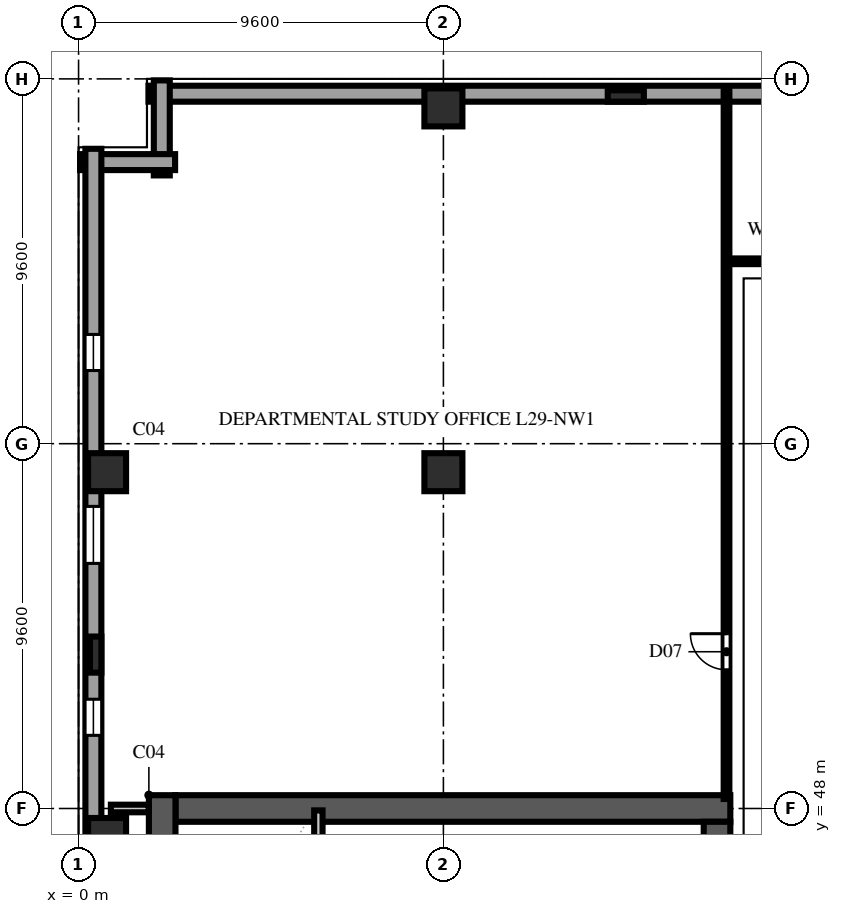
"""IFC4 building model, lengths in metres.
Left out: names, types, materials, properties, quantities, classifications, styles, units other than length and angle.
Written with IfcOpenShell. Run it as: python <this file> out.ifc"""

import sys

from ifc_helpers import new_model, si_unit, direction, frame, frame_2d, origin, origin_2d, place, context, subcontext, project, spatial, rectangle, extrude, element, fill, save


model = new_model("IFC4")
c1 = context("Model", 3, precision=1e-05, world=origin(), true_north=direction((0.0, 1.0)))
c2 = subcontext(c1, "Body", "Model", "MODEL_VIEW")
j1 = project(units=[si_unit("LENGTHUNIT", "METRE"), si_unit("PLANEANGLEUNIT", "RADIAN")], contexts=[c1])
p1 = place(None, origin())
s1 = spatial("IfcSite", under=j1, at=p1, CompositionType="ELEMENT")
p2 = place(p1, origin())
s2 = spatial("IfcBuilding", under=s1, at=p2, CompositionType="ELEMENT")
p3 = place(p2, frame((0.0, 0.0, 116.6)))
s3 = spatial("IfcBuildingStorey", under=s2, at=p3, CompositionType="ELEMENT", Elevation=116.6)
p4 = place(p3, frame((2.55, 48.0, 0.0), z_axis=(0.0, 0.0, 1.0), x_axis=(1.0, 0.0, 0.0)))
e1 = element("IfcWall", 1, at=p4, inside=s3, PredefinedType="SHEAR", context=c2, shape_type="SweptSolid", body=[
    extrude(rectangle(XDim=14.6, YDim=0.7, at=frame_2d((7.3, 0.0))), origin(), (0.0, 0.0, 1.0), 3.54),
])
p5 = place(p3, frame((2.2, 9.25, 0.0), z_axis=(0.0, 0.0, 1.0), x_axis=(0.0, 1.0, 0.0)))
e2 = element("IfcWall", 2, at=p5, inside=s3, PredefinedType="SHEAR", context=c2, shape_type="SweptSolid", body=[
    extrude(rectangle(XDim=39.1, YDim=0.7, at=frame_2d((19.55, 0.0))), origin(), (0.0, 0.0, 1.0), 3.54),
])
p6 = place(p3, frame((16.8, 36.4, 0.0), z_axis=(0.0, 0.0, 1.0), x_axis=(0.0, 1.0, 0.0)))
e3 = element("IfcWall", 3, at=p6, inside=s3, PredefinedType="SHEAR", context=c2, shape_type="SweptSolid", body=[
    extrude(rectangle(XDim=11.25, YDim=0.7, at=frame_2d((5.625, 0.0))), origin(), (0.0, 0.0, 1.0), 3.54),
])
p7 = place(p6, frame((9.2, 0.0, 0.0)))
e4 = element("IfcOpeningElement", 4, at=p7, cuts=e3, PredefinedType="OPENING", context=c2, shape_type="SweptSolid", body=[
    extrude(rectangle(XDim=0.95, YDim=2.15, at=frame_2d((0.475, 1.075))), frame((0.0, 0.362, 0.0), z_axis=(0.0, -1.0, 0.0), x_axis=(1.0, 0.0, 0.0)), (0.0, 0.0, 1.0), 0.724),
])
for number, where, z_axis, x_axis in (
    (5, (0.75, 47.25, 0.0), (0.0, 0.0, 1.0), (1.0, 0.0, 0.0)),
    (6, (0.75, 56.85, 0.0), (0.0, 0.0, 1.0), (1.0, 0.0, 0.0)),
    (7, (9.6, 56.85, 0.0), (0.0, 0.0, 1.0), (1.0, 0.0, 0.0)),
    (8, (9.6, 66.45, 0.0), (0.0, 0.0, 1.0), (1.0, 0.0, 0.0)),
):
    element("IfcColumn", number, at=place(p3, frame(where, z_axis=z_axis, x_axis=x_axis)), inside=s3, PredefinedType="COLUMN", context=c2, shape_type="SweptSolid", body=[
        extrude(rectangle(XDim=1.0, YDim=1.0, at=origin_2d()), origin(), (0.0, 0.0, 1.0), 3.8),
    ])
for number, where, z_axis, x_axis in (
    (9, (0.45, 52.05, 0.0), (0.0, 0.0, 1.0), (0.0, 1.0, 0.0)),
    (10, (14.4, 66.75, 0.0), (0.0, 0.0, 1.0), (1.0, 0.0, 0.0)),
):
    element("IfcColumn", number, at=place(p3, frame(where, z_axis=z_axis, x_axis=x_axis)), inside=s3, PredefinedType="PILASTER", context=c2, shape_type="SweptSolid", body=[
        extrude(rectangle(XDim=0.95, YDim=0.3, at=origin_2d()), origin(), (0.0, 0.0, 1.0), 3.8),
    ])
p8 = place(p3, frame((36.56, 66.81, 0.0), z_axis=(0.0, 0.0, 1.0), x_axis=(-1.0, 0.0, 0.0)))
e11 = element("IfcWall", 11, at=p8, inside=s3, PredefinedType="SOLIDWALL", context=c2, shape_type="SweptSolid", body=[
    extrude(rectangle(XDim=34.72, YDim=0.42, at=frame_2d((17.36, 0.0))), origin(), (0.0, 0.0, 1.0), 3.54),
])
p9 = place(p8, frame((4.885, 0.0, 0.9)))
e12 = element("IfcOpeningElement", 12, at=p9, cuts=e11, PredefinedType="OPENING", context=c2, shape_type="SweptSolid", body=[
    extrude(rectangle(XDim=0.95, YDim=1.85, at=frame_2d((0.475, 0.925))), frame((0.0, 0.222, 0.0), z_axis=(0.0, -1.0, 0.0), x_axis=(1.0, 0.0, 0.0)), (0.0, 0.0, 1.0), 0.444),
])
p10 = place(p8, frame((9.41, 0.0, 0.9)))
e13 = element("IfcOpeningElement", 13, at=p10, cuts=e11, PredefinedType="OPENING", context=c2, shape_type="SweptSolid", body=[
    extrude(rectangle(XDim=1.5, YDim=1.85, at=frame_2d((0.75, 0.925))), frame((0.0, 0.222, 0.0), z_axis=(0.0, -1.0, 0.0), x_axis=(1.0, 0.0, 0.0)), (0.0, 0.0, 1.0), 0.444),
])
p11 = place(p8, frame((14.485, 0.0, 0.9)))
e14 = element("IfcOpeningElement", 14, at=p11, cuts=e11, PredefinedType="OPENING", context=c2, shape_type="SweptSolid", body=[
    extrude(rectangle(XDim=0.95, YDim=1.85, at=frame_2d((0.475, 0.925))), frame((0.0, 0.222, 0.0), z_axis=(0.0, -1.0, 0.0), x_axis=(1.0, 0.0, 0.0)), (0.0, 0.0, 1.0), 0.444),
])
for number, where, z_axis, x_axis in (
    (15, (2.19, 67.16, 0.0), (0.0, 0.0, 1.0), (0.0, -1.0, 0.0)),
    (16, (2.54, 65.01, 0.0), (0.0, 0.0, 1.0), (-1.0, 0.0, 0.0)),
):
    element("IfcWall", number, at=place(p3, frame(where, z_axis=z_axis, x_axis=x_axis)), inside=s3, PredefinedType="SOLIDWALL", context=c2, shape_type="SweptSolid", body=[
        extrude(rectangle(XDim=2.5, YDim=0.42, at=frame_2d((1.25, 0.0))), origin(), (0.0, 0.0, 1.0), 3.54),
    ])
p12 = place(p3, frame((0.39, 65.36, 0.0), z_axis=(0.0, 0.0, 1.0), x_axis=(0.0, -1.0, 0.0)))
e17 = element("IfcWall", 17, at=p12, inside=s3, PredefinedType="SOLIDWALL", context=c2, shape_type="SweptSolid", body=[
    extrude(rectangle(XDim=63.52, YDim=0.42, at=frame_2d((31.76, 0.0))), origin(), (0.0, 0.0, 1.0), 3.54),
])
p13 = place(p12, frame((4.885, 0.0, 0.9)))
e18 = element("IfcOpeningElement", 18, at=p13, cuts=e17, PredefinedType="OPENING", context=c2, shape_type="SweptSolid", body=[
    extrude(rectangle(XDim=0.95, YDim=1.85, at=frame_2d((0.475, 0.925))), frame((0.0, 0.222, 0.0), z_axis=(0.0, -1.0, 0.0), x_axis=(1.0, 0.0, 0.0)), (0.0, 0.0, 1.0), 0.444),
])
p14 = place(p12, frame((9.41, 0.0, 0.9)))
e19 = element("IfcOpeningElement", 19, at=p14, cuts=e17, PredefinedType="OPENING", context=c2, shape_type="SweptSolid", body=[
    extrude(rectangle(XDim=1.5, YDim=1.85, at=frame_2d((0.75, 0.925))), frame((0.0, 0.222, 0.0), z_axis=(0.0, -1.0, 0.0), x_axis=(1.0, 0.0, 0.0)), (0.0, 0.0, 1.0), 0.444),
])
p15 = place(p12, frame((14.485, 0.0, 0.9)))
e20 = element("IfcOpeningElement", 20, at=p15, cuts=e17, PredefinedType="OPENING", context=c2, shape_type="SweptSolid", body=[
    extrude(rectangle(XDim=0.95, YDim=1.85, at=frame_2d((0.475, 0.925))), frame((0.0, 0.222, 0.0), z_axis=(0.0, -1.0, 0.0), x_axis=(1.0, 0.0, 0.0)), (0.0, 0.0, 1.0), 0.444),
])
p16 = place(p12, frame((19.01, 0.0, 0.9)))
e21 = element("IfcOpeningElement", 21, at=p16, cuts=e17, PredefinedType="OPENING", context=c2, shape_type="SweptSolid", body=[
    extrude(rectangle(XDim=1.5, YDim=1.85, at=frame_2d((0.75, 0.925))), frame((0.0, 0.222, 0.0), z_axis=(0.0, -1.0, 0.0), x_axis=(1.0, 0.0, 0.0)), (0.0, 0.0, 1.0), 0.444),
])
p17 = place(p12, frame((24.085, 0.0, 0.9)))
e22 = element("IfcOpeningElement", 22, at=p17, cuts=e17, PredefinedType="OPENING", context=c2, shape_type="SweptSolid", body=[
    extrude(rectangle(XDim=0.95, YDim=1.85, at=frame_2d((0.475, 0.925))), frame((0.0, 0.222, 0.0), z_axis=(0.0, -1.0, 0.0), x_axis=(1.0, 0.0, 0.0)), (0.0, 0.0, 1.0), 0.444),
])
p18 = place(p12, frame((28.61, 0.0, 0.9)))
e23 = element("IfcOpeningElement", 23, at=p18, cuts=e17, PredefinedType="OPENING", context=c2, shape_type="SweptSolid", body=[
    extrude(rectangle(XDim=1.5, YDim=1.85, at=frame_2d((0.75, 0.925))), frame((0.0, 0.222, 0.0), z_axis=(0.0, -1.0, 0.0), x_axis=(1.0, 0.0, 0.0)), (0.0, 0.0, 1.0), 0.444),
])
p19 = place(p12, frame((33.685, 0.0, 0.9)))
e24 = element("IfcOpeningElement", 24, at=p19, cuts=e17, PredefinedType="OPENING", context=c2, shape_type="SweptSolid", body=[
    extrude(rectangle(XDim=0.95, YDim=1.85, at=frame_2d((0.475, 0.925))), frame((0.0, 0.222, 0.0), z_axis=(0.0, -1.0, 0.0), x_axis=(1.0, 0.0, 0.0)), (0.0, 0.0, 1.0), 0.444),
])
p20 = place(p12, frame((38.21, 0.0, 0.9)))
e25 = element("IfcOpeningElement", 25, at=p20, cuts=e17, PredefinedType="OPENING", context=c2, shape_type="SweptSolid", body=[
    extrude(rectangle(XDim=1.5, YDim=1.85, at=frame_2d((0.75, 0.925))), frame((0.0, 0.222, 0.0), z_axis=(0.0, -1.0, 0.0), x_axis=(1.0, 0.0, 0.0)), (0.0, 0.0, 1.0), 0.444),
])
p21 = place(p12, frame((43.285, 0.0, 0.9)))
e26 = element("IfcOpeningElement", 26, at=p21, cuts=e17, PredefinedType="OPENING", context=c2, shape_type="SweptSolid", body=[
    extrude(rectangle(XDim=0.95, YDim=1.85, at=frame_2d((0.475, 0.925))), frame((0.0, 0.222, 0.0), z_axis=(0.0, -1.0, 0.0), x_axis=(1.0, 0.0, 0.0)), (0.0, 0.0, 1.0), 0.444),
])
p22 = place(p12, frame((47.81, 0.0, 0.9)))
e27 = element("IfcOpeningElement", 27, at=p22, cuts=e17, PredefinedType="OPENING", context=c2, shape_type="SweptSolid", body=[
    extrude(rectangle(XDim=1.5, YDim=1.85, at=frame_2d((0.75, 0.925))), frame((0.0, 0.222, 0.0), z_axis=(0.0, -1.0, 0.0), x_axis=(1.0, 0.0, 0.0)), (0.0, 0.0, 1.0), 0.444),
])
p23 = place(p12, frame((52.885, 0.0, 0.9)))
e28 = element("IfcOpeningElement", 28, at=p23, cuts=e17, PredefinedType="OPENING", context=c2, shape_type="SweptSolid", body=[
    extrude(rectangle(XDim=0.95, YDim=1.85, at=frame_2d((0.475, 0.925))), frame((0.0, 0.222, 0.0), z_axis=(0.0, -1.0, 0.0), x_axis=(1.0, 0.0, 0.0)), (0.0, 0.0, 1.0), 0.444),
])
p24 = place(p3, frame((6.31, 40.14, 0.0), z_axis=(0.0, 0.0, 1.0), x_axis=(0.0, 1.0, 0.0)))
e29 = element("IfcWall", 29, at=p24, inside=s3, PredefinedType="SOLIDWALL", context=c2, shape_type="SweptSolid", body=[
    extrude(rectangle(XDim=7.81, YDim=0.22, at=frame_2d((3.905, 0.0))), origin(), (0.0, 0.0, 1.0), 3.54),
])
p25 = place(p3, frame((0.85, 48.0, 0.0), z_axis=(0.0, 0.0, 1.0), x_axis=(1.0, 0.0, 0.0)))
e30 = element("IfcWall", 30, at=p25, inside=s3, PredefinedType="SOLIDWALL", context=c2, shape_type="SweptSolid", body=[
    extrude(rectangle(XDim=0.995, YDim=0.2, at=frame_2d((0.498, 0.0))), origin(), (0.0, 0.0, 1.0), 3.54),
])
p26 = place(p3, frame((17.05, 62.4, 0.0), z_axis=(0.0, 0.0, 1.0), x_axis=(1.0, 0.0, 0.0)))
e31 = element("IfcWall", 31, at=p26, inside=s3, PredefinedType="PARTITIONING", context=c2, shape_type="SweptSolid", body=[
    extrude(rectangle(XDim=2.15, YDim=0.15, at=frame_2d((1.075, 0.0))), origin(), (0.0, 0.0, 1.0), 3.54),
])
p27 = place(p3, frame((17.05, 48.25, 0.0), z_axis=(0.0, 0.0, 1.0), x_axis=(0.0, 1.0, 0.0)))
e32 = element("IfcWall", 32, at=p27, inside=s3, PredefinedType="PARTITIONING", context=c2, shape_type="SweptSolid", body=[
    extrude(rectangle(XDim=18.73, YDim=0.15, at=frame_2d((9.365, 0.0))), origin(), (0.0, 0.0, 1.0), 3.54),
])
p28 = place(p27, frame((3.4, 0.0, 0.0)))
e33 = element("IfcOpeningElement", 33, at=p28, cuts=e32, PredefinedType="OPENING", context=c2, shape_type="SweptSolid", body=[
    extrude(rectangle(XDim=0.95, YDim=2.15, at=frame_2d((0.475, 1.075))), frame((0.0, 0.087, 0.0), z_axis=(0.0, -1.0, 0.0), x_axis=(1.0, 0.0, 0.0)), (0.0, 0.0, 1.0), 0.174),
])
p29 = place(p13, origin())
e34 = element("IfcWindow", 34, at=p29, inside=s3, PartitioningType="SINGLE_PANEL", PredefinedType="WINDOW", context=c2, shape_type="SweptSolid", body=[
    extrude(rectangle(XDim=0.95, YDim=1.85, at=frame_2d((0.475, 0.925))), frame((0.0, 0.11, 0.0), z_axis=(0.0, -1.0, 0.0), x_axis=(1.0, 0.0, 0.0)), (0.0, 0.0, 1.0), 0.06),
])
fill(e18, e34)
p30 = place(p14, origin())
e35 = element("IfcWindow", 35, at=p30, inside=s3, PartitioningType="DOUBLE_PANEL_VERTICAL", PredefinedType="WINDOW", context=c2, shape_type="SweptSolid", body=[
    extrude(rectangle(XDim=1.5, YDim=1.85, at=frame_2d((0.75, 0.925))), frame((0.0, 0.11, 0.0), z_axis=(0.0, -1.0, 0.0), x_axis=(1.0, 0.0, 0.0)), (0.0, 0.0, 1.0), 0.06),
])
fill(e19, e35)
p31 = place(p15, origin())
e36 = element("IfcWindow", 36, at=p31, inside=s3, PartitioningType="SINGLE_PANEL", PredefinedType="WINDOW", context=c2, shape_type="SweptSolid", body=[
    extrude(rectangle(XDim=0.95, YDim=1.85, at=frame_2d((0.475, 0.925))), frame((0.0, 0.11, 0.0), z_axis=(0.0, -1.0, 0.0), x_axis=(1.0, 0.0, 0.0)), (0.0, 0.0, 1.0), 0.06),
])
fill(e20, e36)
p32 = place(p28, origin())
e37 = element("IfcDoor", 37, at=p32, inside=s3, OperationType="SINGLE_SWING_RIGHT", PredefinedType="DOOR", context=c2, shape_type="SweptSolid", body=[
    extrude(rectangle(XDim=0.95, YDim=2.15, at=frame_2d((0.475, 1.075))), frame((0.0, 0.025, 0.0), z_axis=(0.0, -1.0, 0.0), x_axis=(1.0, 0.0, 0.0)), (0.0, 0.0, 1.0), 0.05),
])
fill(e33, e37)
save(model, sys.argv[1])
